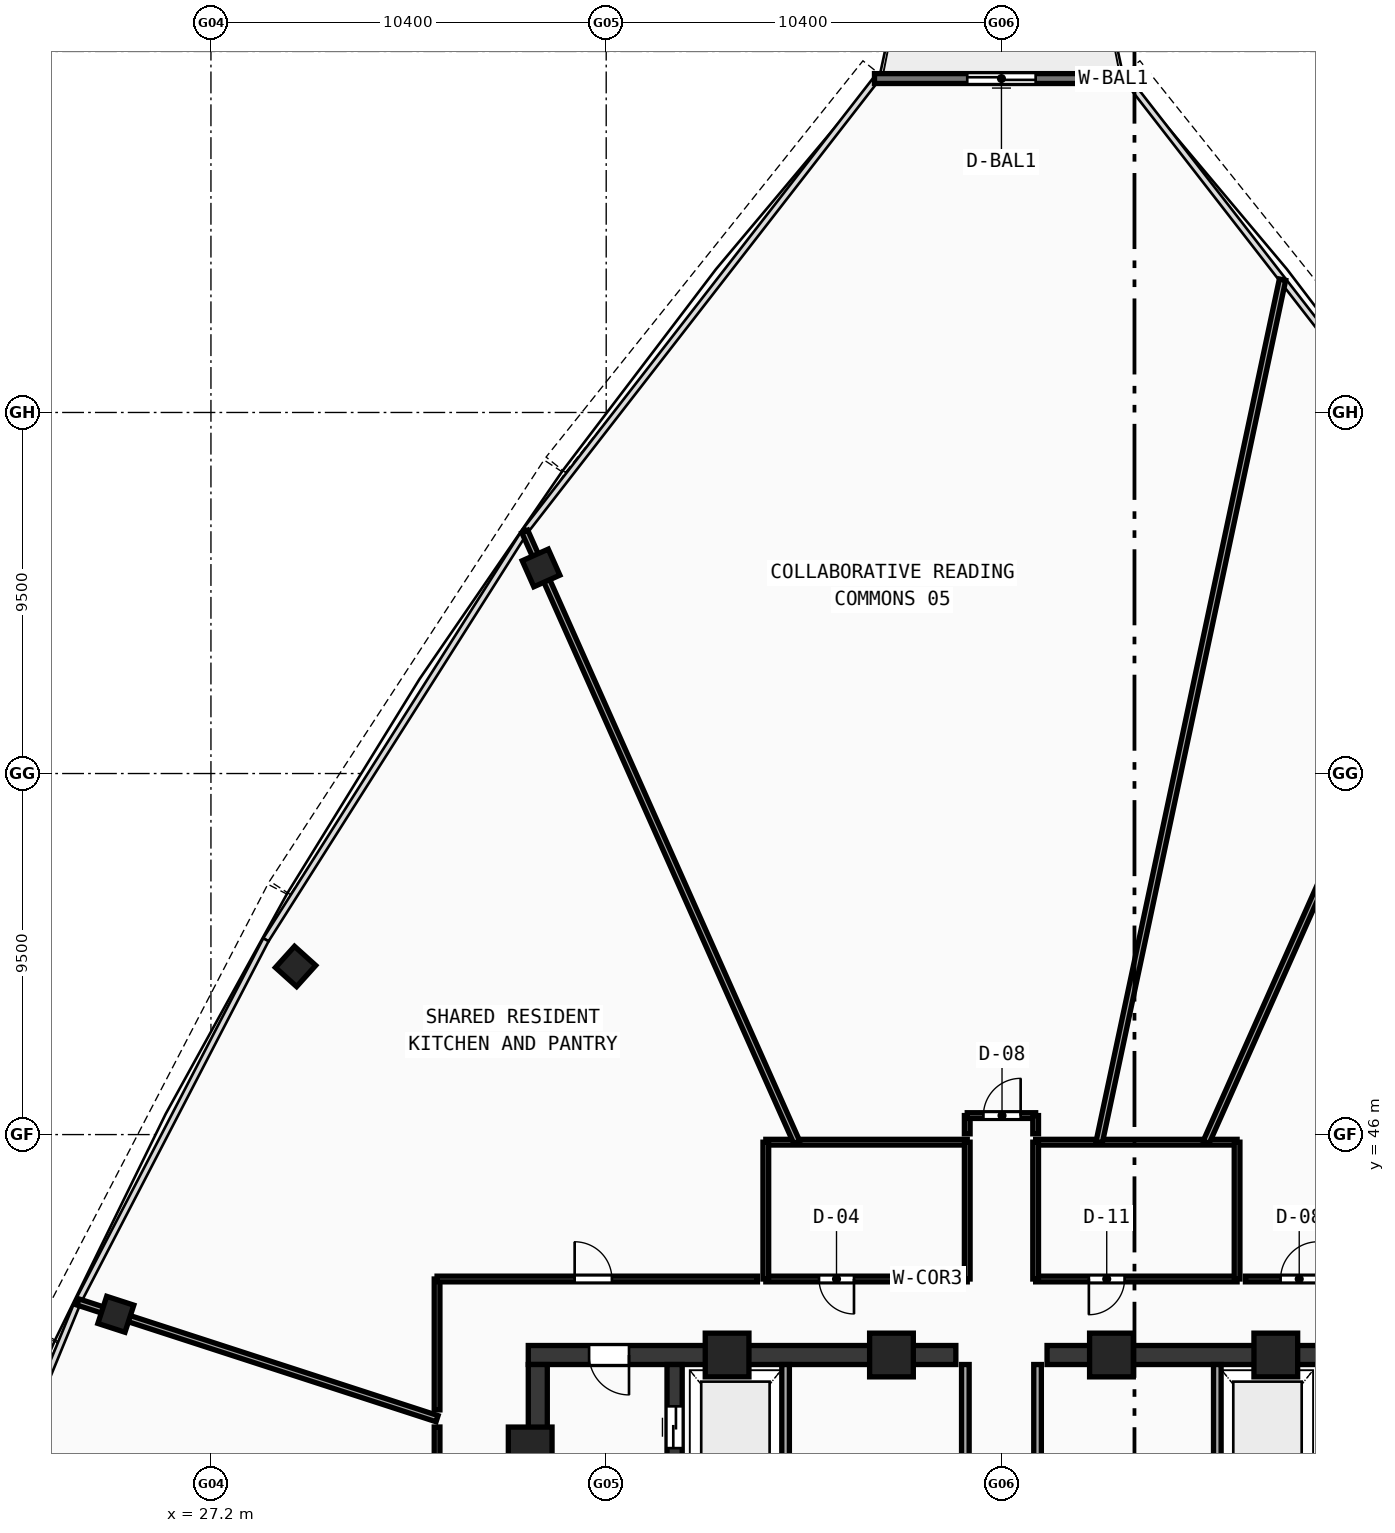
"""IFC4 building model, lengths in metres.
Left out: names, types, materials, properties, quantities, classifications, styles, units other than length and angle.
Written with IfcOpenShell. Run it as: python <this file> out.ifc"""

import sys

from ifc_helpers import new_model, si_unit, direction, frame, frame_2d, origin, origin_with_axes, origin_2d, place, context, subcontext, project, spatial, rectangle, hollow_rectangle, extrude, source, transform, mapped, element, fill, save


model = new_model("IFC4")
c1 = context("Model", 3, precision=1e-05, world=origin(), true_north=direction((0.0, 1.0)))
c2 = subcontext(c1, "Body", "Model", "MODEL_VIEW")
j1 = project(units=[si_unit("LENGTHUNIT", "METRE"), si_unit("PLANEANGLEUNIT", "RADIAN")], contexts=[c1])
p1 = place(None, origin())
s1 = spatial("IfcSite", under=j1, at=p1, CompositionType="ELEMENT")
p2 = place(p1, origin())
s2 = spatial("IfcBuilding", under=s1, at=p2, CompositionType="ELEMENT")
p3 = place(p2, frame((0.0, 0.0, 314.86)))
s3 = spatial("IfcBuildingStorey", under=s2, at=p3, CompositionType="ELEMENT", Elevation=314.86)
p4 = place(p3, frame((35.55, 40.2, 0.0), z_axis=(0.0, 0.0, 1.0), x_axis=(1.0, 0.0, 0.0)))
e1 = element("IfcWall", 1, at=p4, inside=s3, PredefinedType="SHEAR", context=c2, shape_type="SweptSolid", body=[
    extrude(rectangle(XDim=11.25, YDim=0.5, at=frame_2d((5.625, 0.0))), origin(), (0.0, 0.0, 1.0), 5.57),
])
p5 = place(p4, frame((1.6, 0.0, 0.0)))
e2 = element("IfcOpeningElement", 2, at=p5, cuts=e1, PredefinedType="OPENING", context=c2, shape_type="SweptSolid", body=[
    extrude(rectangle(XDim=1.05, YDim=2.1, at=frame_2d((0.525, 1.05))), frame((0.0, 0.26, 0.0), z_axis=(0.0, -1.0, 0.0), x_axis=(1.0, 0.0, 0.0)), (0.0, 0.0, 1.0), 0.52),
])
p6 = place(p3, frame((49.2, 40.2, 0.0), z_axis=(0.0, 0.0, 1.0), x_axis=(1.0, 0.0, 0.0)))
e3 = element("IfcWall", 3, at=p6, inside=s3, PredefinedType="SHEAR", context=c2, shape_type="SweptSolid", body=[
    extrude(rectangle(XDim=11.25, YDim=0.5, at=frame_2d((5.625, 0.0))), origin(), (0.0, 0.0, 1.0), 5.57),
])
p7 = place(p6, frame((8.6, 0.0, 0.0)))
e4 = element("IfcOpeningElement", 4, at=p7, cuts=e3, PredefinedType="OPENING", context=c2, shape_type="SweptSolid", body=[
    extrude(rectangle(XDim=1.05, YDim=2.1, at=frame_2d((0.525, 1.05))), frame((0.0, 0.26, 0.0), z_axis=(0.0, -1.0, 0.0), x_axis=(1.0, 0.0, 0.0)), (0.0, 0.0, 1.0), 0.52),
])
p8 = place(p3, frame((35.8, 27.75, 0.0), z_axis=(0.0, 0.0, 1.0), x_axis=(0.0, 1.0, 0.0)))
e5 = element("IfcWall", 5, at=p8, inside=s3, PredefinedType="SHEAR", context=c2, shape_type="SweptSolid", body=[
    extrude(rectangle(XDim=12.2, YDim=0.5, at=frame_2d((6.1, 0.0))), origin(), (0.0, 0.0, 1.0), 5.57),
])
p9 = place(p3, frame((39.4, 27.75, 0.0), z_axis=(0.0, 0.0, 1.0), x_axis=(0.0, 1.0, 0.0)))
e6 = element("IfcWall", 6, at=p9, inside=s3, PredefinedType="SHEAR", context=c2, shape_type="SweptSolid", body=[
    extrude(rectangle(XDim=12.2, YDim=0.4, at=frame_2d((6.1, 0.0))), origin(), (0.0, 0.0, 1.0), 5.57),
])
p10 = place(p9, frame((10.0, 0.0, 0.0)))
e7 = element("IfcOpeningElement", 7, at=p10, cuts=e6, PredefinedType="OPENING", context=c2, shape_type="SweptSolid", body=[
    extrude(rectangle(XDim=1.1, YDim=2.1, at=frame_2d((0.55, 1.05))), frame((0.0, 0.21, 0.0), z_axis=(0.0, -1.0, 0.0), x_axis=(1.0, 0.0, 0.0)), (0.0, 0.0, 1.0), 0.42),
])
m1 = source(origin(), c2, "Body", "SweptSolid", [
    extrude(hollow_rectangle(XDim=1.15, YDim=1.15, WallThickness=0.048, at=origin_2d()), origin(), (0.0, 0.0, 1.0), 5.83),
])
for number, where, z_axis, x_axis in (
    (8, (55.219, 40.2, -0.26), (0.0, 0.0, 1.0), (1.0, 0.0, 0.0)),
    (9, (50.894, 40.2, -0.26), (0.0, 0.0, 1.0), (1.0, 0.0, 0.0)),
    (10, (45.106, 40.2, -0.26), (0.0, 0.0, 1.0), (1.0, 0.0, 0.0)),
    (11, (40.781, 40.2, -0.26), (0.0, 0.0, 1.0), (1.0, 0.0, 0.0)),
    (12, (35.6, 37.729, -0.26), (0.0, 0.0, 1.0), (1.0, 0.0, 0.0)),
):
    element("IfcColumn", number, at=place(p3, frame(where, z_axis=z_axis, x_axis=x_axis)), inside=s3, PredefinedType="COLUMN", context=c2, shape_type="MappedRepresentation", body=[
        mapped(m1, transform((0.0, 0.0, 0.0), scale=1.0)),
    ])
m2 = source(origin(), c2, "Body", "SweptSolid", [
    extrude(hollow_rectangle(XDim=0.75, YDim=0.75, WallThickness=0.028, at=origin_2d()), origin(), (0.0, 0.0, 1.0), 5.83),
])
for number, where, z_axis, x_axis in (
    (13, (35.886, 60.909, -0.26), (0.0, 0.0, 1.0), (-0.914, -0.407, 0.0)),
    (14, (29.427, 50.424, -0.26), (0.0, 0.0, 1.0), (-0.669, -0.743, 0.0)),
    (15, (24.698, 41.271, -0.26), (0.0, 0.0, 1.0), (-0.309, -0.951, 0.0)),
):
    element("IfcColumn", number, at=place(p3, frame(where, z_axis=z_axis, x_axis=x_axis)), inside=s3, PredefinedType="COLUMN", context=c2, shape_type="MappedRepresentation", body=[
        mapped(m2, transform((0.0, 0.0, 0.0), scale=1.0)),
    ])
p11 = place(p3, frame((51.341, 73.786, 0.0), z_axis=(0.0, 0.0, 1.0), x_axis=(-1.0, 0.0, 0.0)))
e16 = element("IfcWall", 16, at=p11, inside=s3, PredefinedType="STANDARD", context=c2, shape_type="SweptSolid", body=[
    extrude(rectangle(XDim=6.682, YDim=0.26, at=frame_2d((3.341, 0.0))), origin(), (0.0, 0.0, 1.0), 5.57),
])
p12 = place(p11, frame((2.441, 0.0, 0.0)))
e17 = element("IfcOpeningElement", 17, at=p12, cuts=e16, PredefinedType="OPENING", context=c2, shape_type="SweptSolid", body=[
    extrude(rectangle(XDim=1.8, YDim=2.15, at=frame_2d((0.9, 1.075))), frame((0.0, 0.14, 0.0), z_axis=(0.0, -1.0, 0.0), x_axis=(1.0, 0.0, 0.0)), (0.0, 0.0, 1.0), 0.28),
])
p13 = place(p3, frame((42.32, 33.5, 0.0), z_axis=(0.0, 0.0, 1.0), x_axis=(0.0, 1.0, 0.0)))
e18 = element("IfcWall", 18, at=p13, inside=s3, PredefinedType="SOLIDWALL", context=c2, shape_type="SweptSolid", body=[
    extrude(rectangle(XDim=6.45, YDim=0.2, at=frame_2d((3.225, 0.0))), origin(), (0.0, 0.0, 1.0), 5.57),
])
p14 = place(p13, frame((1.0, 0.0, 0.0)))
e19 = element("IfcOpeningElement", 19, at=p14, cuts=e18, PredefinedType="OPENING", context=c2, shape_type="SweptSolid", body=[
    extrude(rectangle(XDim=1.05, YDim=2.1, at=frame_2d((0.525, 1.05))), frame((0.0, 0.11, 0.0), z_axis=(0.0, -1.0, 0.0), x_axis=(1.0, 0.0, 0.0)), (0.0, 0.0, 1.0), 0.22),
])
p15 = place(p3, frame((53.68, 36.65, 0.0), z_axis=(0.0, 0.0, 1.0), x_axis=(0.0, 1.0, 0.0)))
e20 = element("IfcWall", 20, at=p15, inside=s3, PredefinedType="SOLIDWALL", context=c2, shape_type="SweptSolid", body=[
    extrude(rectangle(XDim=3.3, YDim=0.2, at=frame_2d((1.65, 0.0))), origin(), (0.0, 0.0, 1.0), 5.57),
])
p16 = place(p3, frame((47.05, 37.32, 0.0), z_axis=(0.0, 0.0, 1.0), x_axis=(0.0, 1.0, 0.0)))
e21 = element("IfcWall", 21, at=p16, inside=s3, PredefinedType="SOLIDWALL", context=c2, shape_type="SweptSolid", body=[
    extrude(rectangle(XDim=2.63, YDim=0.2, at=frame_2d((1.315, 0.0))), origin(), (0.0, 0.0, 1.0), 5.57),
])
p17 = place(p3, frame((48.95, 35.85, 0.0), z_axis=(0.0, 0.0, 1.0), x_axis=(0.0, 1.0, 0.0)))
e22 = element("IfcWall", 22, at=p17, inside=s3, PredefinedType="SOLIDWALL", context=c2, shape_type="SweptSolid", body=[
    extrude(rectangle(XDim=4.1, YDim=0.2, at=frame_2d((2.05, 0.0))), origin(), (0.0, 0.0, 1.0), 5.57),
])
p18 = place(p3, frame((41.8, 42.2, 0.0), z_axis=(0.0, 0.0, 1.0), x_axis=(1.0, 0.0, 0.0)))
e23 = element("IfcWall", 23, at=p18, inside=s3, PredefinedType="PARTITIONING", context=c2, shape_type="SweptSolid", body=[
    extrude(rectangle(XDim=5.3, YDim=0.15, at=frame_2d((2.65, 0.0))), origin(), (0.0, 0.0, 1.0), 2.22),
])
p19 = place(p18, frame((1.4, 0.0, 0.0)))
e24 = element("IfcOpeningElement", 24, at=p19, cuts=e23, PredefinedType="OPENING", context=c2, shape_type="SweptSolid", body=[
    extrude(rectangle(XDim=0.92, YDim=2.1, at=frame_2d((0.46, 1.05))), frame((0.0, 0.085, 0.0), z_axis=(0.0, -1.0, 0.0), x_axis=(1.0, 0.0, 0.0)), (0.0, 0.0, 1.0), 0.17),
])
p20 = place(p3, frame((41.8, 45.8, 0.0), z_axis=(0.0, 0.0, 1.0), x_axis=(1.0, 0.0, 0.0)))
e25 = element("IfcWall", 25, at=p20, inside=s3, PredefinedType="PARTITIONING", context=c2, shape_type="SweptSolid", body=[
    extrude(rectangle(XDim=5.3, YDim=0.15, at=frame_2d((2.65, 0.0))), origin(), (0.0, 0.0, 1.0), 2.22),
])
p21 = place(p3, frame((41.8, 42.2, 0.0), z_axis=(0.0, 0.0, 1.0), x_axis=(0.0, 1.0, 0.0)))
e26 = element("IfcWall", 26, at=p21, inside=s3, PredefinedType="PARTITIONING", context=c2, shape_type="SweptSolid", body=[
    extrude(rectangle(XDim=3.6, YDim=0.15, at=frame_2d((1.8, 0.0))), origin(), (0.0, 0.0, 1.0), 5.22),
])
p22 = place(p3, frame((47.1, 42.2, 0.0), z_axis=(0.0, 0.0, 1.0), x_axis=(0.0, 1.0, 0.0)))
e27 = element("IfcWall", 27, at=p22, inside=s3, PredefinedType="PARTITIONING", context=c2, shape_type="SweptSolid", body=[
    extrude(rectangle(XDim=3.6, YDim=0.15, at=frame_2d((1.8, 0.0))), origin(), (0.0, 0.0, 1.0), 5.57),
])
p23 = place(p3, frame((48.9, 42.2, 0.0), z_axis=(0.0, 0.0, 1.0), x_axis=(1.0, 0.0, 0.0)))
e28 = element("IfcWall", 28, at=p23, inside=s3, PredefinedType="PARTITIONING", context=c2, shape_type="SweptSolid", body=[
    extrude(rectangle(XDim=5.3, YDim=0.15, at=frame_2d((2.65, 0.0))), origin(), (0.0, 0.0, 1.0), 2.22),
])
p24 = place(p23, frame((1.4, 0.0, 0.0)))
e29 = element("IfcOpeningElement", 29, at=p24, cuts=e28, PredefinedType="OPENING", context=c2, shape_type="SweptSolid", body=[
    extrude(rectangle(XDim=0.94, YDim=2.1, at=frame_2d((0.47, 1.05))), frame((0.0, 0.085, 0.0), z_axis=(0.0, -1.0, 0.0), x_axis=(1.0, 0.0, 0.0)), (0.0, 0.0, 1.0), 0.17),
])
p25 = place(p3, frame((48.9, 45.8, 0.0), z_axis=(0.0, 0.0, 1.0), x_axis=(1.0, 0.0, 0.0)))
e30 = element("IfcWall", 30, at=p25, inside=s3, PredefinedType="PARTITIONING", context=c2, shape_type="SweptSolid", body=[
    extrude(rectangle(XDim=5.3, YDim=0.15, at=frame_2d((2.65, 0.0))), origin(), (0.0, 0.0, 1.0), 2.22),
])
p26 = place(p3, frame((48.9, 42.2, 0.0), z_axis=(0.0, 0.0, 1.0), x_axis=(0.0, 1.0, 0.0)))
e31 = element("IfcWall", 31, at=p26, inside=s3, PredefinedType="PARTITIONING", context=c2, shape_type="SweptSolid", body=[
    extrude(rectangle(XDim=3.6, YDim=0.15, at=frame_2d((1.8, 0.0))), origin(), (0.0, 0.0, 1.0), 5.57),
])
p27 = place(p3, frame((54.2, 42.2, 0.0), z_axis=(0.0, 0.0, 1.0), x_axis=(0.0, 1.0, 0.0)))
e32 = element("IfcWall", 32, at=p27, inside=s3, PredefinedType="PARTITIONING", context=c2, shape_type="SweptSolid", body=[
    extrude(rectangle(XDim=3.6, YDim=0.15, at=frame_2d((1.8, 0.0))), origin(), (0.0, 0.0, 1.0), 5.22),
])
p28 = place(p3, frame((53.387, 45.8, 0.0), z_axis=(0.0, 0.0, 1.0), x_axis=(0.406746244391, 0.913541182801, 0.0)))
e33 = element("IfcWall", 33, at=p28, inside=s3, PredefinedType="PARTITIONING", context=c2, shape_type="SweptSolid", body=[
    extrude(rectangle(XDim=17.589, YDim=0.17, at=frame_2d((8.794, 0.0))), origin(), (0.0, 0.0, 1.0), 2.22),
])
p29 = place(p3, frame((50.572, 45.8, 0.0), z_axis=(0.0, 0.0, 1.0), x_axis=(0.207911865665, 0.978147563569, 0.0)))
e34 = element("IfcWall", 34, at=p29, inside=s3, PredefinedType="PARTITIONING", context=c2, shape_type="SweptSolid", body=[
    extrude(rectangle(XDim=23.201, YDim=0.17, at=frame_2d((11.601, 0.0))), origin(), (0.0, 0.0, 1.0), 4.97),
])
p30 = place(p3, frame((42.613, 45.8, 0.0), z_axis=(0.0, 0.0, 1.0), x_axis=(-0.406746244391, 0.913541182801, 0.0)))
e35 = element("IfcWall", 35, at=p30, inside=s3, PredefinedType="PARTITIONING", context=c2, shape_type="SweptSolid", body=[
    extrude(rectangle(XDim=17.589, YDim=0.17, at=frame_2d((8.794, 0.0))), origin(), (0.0, 0.0, 1.0), 2.22),
])
p31 = place(p3, frame((33.15, 38.525, 0.0), z_axis=(0.0, 0.0, 1.0), x_axis=(-0.951056273407, 0.309017741906, 0.0)))
e36 = element("IfcWall", 36, at=p31, inside=s3, PredefinedType="PARTITIONING", context=c2, shape_type="SweptSolid", body=[
    extrude(rectangle(XDim=9.937, YDim=0.17, at=frame_2d((4.969, 0.0))), origin(), (0.0, 0.0, 1.0), 2.22),
])
p32 = place(p3, frame((33.15, 31.301, 0.0), z_axis=(0.0, 0.0, 1.0), x_axis=(0.0, 1.0, 0.0)))
e37 = element("IfcWall", 37, at=p32, inside=s3, PredefinedType="PARTITIONING", context=c2, shape_type="SweptSolid", body=[
    extrude(rectangle(XDim=7.004, YDim=0.15, at=frame_2d((3.502, 0.0))), origin(), (0.0, 0.0, 1.0), 2.22),
])
p33 = place(p32, frame((3.027, 0.0, 0.0)))
e38 = element("IfcOpeningElement", 38, at=p33, cuts=e37, PredefinedType="OPENING", context=c2, shape_type="SweptSolid", body=[
    extrude(rectangle(XDim=0.98, YDim=2.12, at=frame_2d((0.49, 1.06))), frame((0.0, 0.085, 0.0), z_axis=(0.0, -1.0, 0.0), x_axis=(1.0, 0.0, 0.0)), (0.0, 0.0, 1.0), 0.17),
])
p34 = place(p3, frame((33.15, 38.756, 0.0), z_axis=(0.0, 0.0, 1.0), x_axis=(0.0, 1.0, 0.0)))
e39 = element("IfcWall", 39, at=p34, inside=s3, PredefinedType="PARTITIONING", context=c2, shape_type="SweptSolid", body=[
    extrude(rectangle(XDim=3.444, YDim=0.15, at=frame_2d((1.722, 0.0))), origin(), (0.0, 0.0, 1.0), 2.22),
])
p35 = place(p3, frame((33.15, 42.2, 0.0), z_axis=(0.0, 0.0, 1.0), x_axis=(1.0, 0.0, 0.0)))
e40 = element("IfcWall", 40, at=p35, inside=s3, PredefinedType="PARTITIONING", context=c2, shape_type="SweptSolid", body=[
    extrude(rectangle(XDim=8.43, YDim=0.15, at=frame_2d((4.215, 0.0))), origin(), (0.0, 0.0, 1.0), 2.22),
])
p36 = place(p35, frame((3.62, 0.0, 0.0)))
e41 = element("IfcOpeningElement", 41, at=p36, cuts=e40, PredefinedType="OPENING", context=c2, shape_type="SweptSolid", body=[
    extrude(rectangle(XDim=0.98, YDim=2.12, at=frame_2d((0.49, 1.06))), frame((0.0, 0.085, 0.0), z_axis=(0.0, -1.0, 0.0), x_axis=(1.0, 0.0, 0.0)), (0.0, 0.0, 1.0), 0.17),
])
p37 = place(p3, frame((47.1, 46.02, 0.0), z_axis=(0.0, 0.0, 1.0), x_axis=(0.0, 1.0, 0.0)))
e42 = element("IfcWall", 42, at=p37, inside=s3, PredefinedType="PARTITIONING", context=c2, shape_type="SweptSolid", body=[
    extrude(rectangle(XDim=0.48, YDim=0.15, at=frame_2d((0.24, 0.0))), origin(), (0.0, 0.0, 1.0), 5.22),
])
p38 = place(p3, frame((47.1, 46.5, 0.0), z_axis=(0.0, 0.0, 1.0), x_axis=(1.0, 0.0, 0.0)))
e43 = element("IfcWall", 43, at=p38, inside=s3, PredefinedType="PARTITIONING", context=c2, shape_type="SweptSolid", body=[
    extrude(rectangle(XDim=1.8, YDim=0.15, at=frame_2d((0.9, 0.0))), origin(), (0.0, 0.0, 1.0), 5.22),
])
p39 = place(p38, frame((0.425, 0.0, 0.0)))
e44 = element("IfcOpeningElement", 44, at=p39, cuts=e43, PredefinedType="OPENING", context=c2, shape_type="SweptSolid", body=[
    extrude(rectangle(XDim=0.98, YDim=2.12, at=frame_2d((0.49, 1.06))), frame((0.0, 0.085, 0.0), z_axis=(0.0, -1.0, 0.0), x_axis=(1.0, 0.0, 0.0)), (0.0, 0.0, 1.0), 0.17),
])
p40 = place(p3, frame((48.9, 46.5, 0.0), z_axis=(0.0, 0.0, 1.0), x_axis=(0.0, -1.0, 0.0)))
e45 = element("IfcWall", 45, at=p40, inside=s3, PredefinedType="PARTITIONING", context=c2, shape_type="SweptSolid", body=[
    extrude(rectangle(XDim=0.48, YDim=0.15, at=frame_2d((0.24, 0.0))), origin(), (0.0, 0.0, 1.0), 5.22),
])
p41 = place(p3, frame((54.42, 42.2, 0.0), z_axis=(0.0, 0.0, 1.0), x_axis=(1.0, 0.0, 0.0)))
e46 = element("IfcWall", 46, at=p41, inside=s3, PredefinedType="PARTITIONING", context=c2, shape_type="SweptSolid", body=[
    extrude(rectangle(XDim=2.801, YDim=0.15, at=frame_2d((1.4, 0.0))), origin(), (0.0, 0.0, 1.0), 2.22),
])
p42 = place(p41, frame((0.925, 0.0, 0.0)))
e47 = element("IfcOpeningElement", 47, at=p42, cuts=e46, PredefinedType="OPENING", context=c2, shape_type="SweptSolid", body=[
    extrude(rectangle(XDim=0.98, YDim=2.12, at=frame_2d((0.49, 1.06))), frame((0.0, 0.085, 0.0), z_axis=(0.0, -1.0, 0.0), x_axis=(1.0, 0.0, 0.0)), (0.0, 0.0, 1.0), 0.17),
])
m3 = source(origin(), c2, "Body", "SweptSolid", [
    extrude(rectangle(XDim=1.8, YDim=2.15, at=frame_2d((0.9, 1.075))), frame((0.0, 0.025, 0.0), z_axis=(0.0, -1.0, 0.0), x_axis=(1.0, 0.0, 0.0)), (0.0, 0.0, 1.0), 0.05),
])
p43 = place(p12, origin_with_axes())
e48 = element("IfcDoor", 48, at=p43, inside=s3, OperationType="DOUBLE_DOOR_SLIDING", PredefinedType="DOOR", context=c2, shape_type="MappedRepresentation", body=[
    mapped(m3, transform((0.0, 0.0, 0.0), scale=1.0)),
])
fill(e17, e48)
m4 = source(origin(), c2, "Body", "SweptSolid", [
    extrude(rectangle(XDim=1.05, YDim=2.1, at=frame_2d((0.525, 1.05))), frame((0.0, 0.025, 0.0), z_axis=(0.0, -1.0, 0.0), x_axis=(1.0, 0.0, 0.0)), (0.0, 0.0, 1.0), 0.05),
])
p44 = place(p5, frame((1.05, 0.0, 0.0), z_axis=(0.0, 0.0, 1.0), x_axis=(-1.0, 0.0, 0.0)))
e49 = element("IfcDoor", 49, at=p44, inside=s3, OperationType="SINGLE_SWING_LEFT", PredefinedType="DOOR", context=c2, shape_type="MappedRepresentation", body=[
    mapped(m4, transform((0.0, 0.0, 0.0), scale=1.0)),
])
fill(e2, e49)
m5 = source(origin(), c2, "Body", "SweptSolid", [
    extrude(rectangle(XDim=1.1, YDim=2.1, at=frame_2d((0.55, 1.05))), frame((0.0, 0.025, 0.0), z_axis=(0.0, -1.0, 0.0), x_axis=(1.0, 0.0, 0.0)), (0.0, 0.0, 1.0), 0.05),
])
p45 = place(p10, frame((1.1, 0.0, 0.0), z_axis=(0.0, 0.0, 1.0), x_axis=(-1.0, 0.0, 0.0)))
e50 = element("IfcDoor", 50, at=p45, inside=s3, OperationType="DOUBLE_DOOR_SLIDING", PredefinedType="DOOR", context=c2, shape_type="MappedRepresentation", body=[
    mapped(m5, transform((0.0, 0.0, 0.0), scale=1.0)),
])
fill(e7, e50)
m6 = source(origin(), c2, "Body", "SweptSolid", [
    extrude(rectangle(XDim=0.92, YDim=2.1, at=frame_2d((0.46, 1.05))), frame((0.0, 0.025, 0.0), z_axis=(0.0, -1.0, 0.0), x_axis=(1.0, 0.0, 0.0)), (0.0, 0.0, 1.0), 0.05),
])
p46 = place(p19, frame((0.92, 0.0, 0.0), z_axis=(0.0, 0.0, 1.0), x_axis=(-1.0, 0.0, 0.0)))
e51 = element("IfcDoor", 51, at=p46, inside=s3, OperationType="SINGLE_SWING_LEFT", PredefinedType="DOOR", context=c2, shape_type="MappedRepresentation", body=[
    mapped(m6, transform((0.0, 0.0, 0.0), scale=1.0)),
])
fill(e24, e51)
m7 = source(origin(), c2, "Body", "SweptSolid", [
    extrude(rectangle(XDim=0.94, YDim=2.1, at=frame_2d((0.47, 1.05))), frame((0.0, 0.025, 0.0), z_axis=(0.0, -1.0, 0.0), x_axis=(1.0, 0.0, 0.0)), (0.0, 0.0, 1.0), 0.05),
])
p47 = place(p24, frame((0.94, 0.0, 0.0), z_axis=(0.0, 0.0, 1.0), x_axis=(-1.0, 0.0, 0.0)))
e52 = element("IfcDoor", 52, at=p47, inside=s3, OperationType="SINGLE_SWING_RIGHT", PredefinedType="DOOR", context=c2, shape_type="MappedRepresentation", body=[
    mapped(m7, transform((0.0, 0.0, 0.0), scale=1.0)),
])
fill(e29, e52)
m8 = source(origin(), c2, "Body", "SweptSolid", [
    extrude(rectangle(XDim=0.98, YDim=2.12, at=frame_2d((0.49, 1.06))), frame((0.0, 0.025, 0.0), z_axis=(0.0, -1.0, 0.0), x_axis=(1.0, 0.0, 0.0)), (0.0, 0.0, 1.0), 0.05),
])
p48 = place(p42, origin_with_axes())
e53 = element("IfcDoor", 53, at=p48, inside=s3, OperationType="SINGLE_SWING_RIGHT", PredefinedType="DOOR", context=c2, shape_type="MappedRepresentation", body=[
    mapped(m8, transform((0.0, 0.0, 0.0), scale=1.0)),
])
fill(e47, e53)
p49 = place(p39, origin_with_axes())
e54 = element("IfcDoor", 54, at=p49, inside=s3, OperationType="SINGLE_SWING_RIGHT", PredefinedType="DOOR", context=c2, shape_type="MappedRepresentation", body=[
    mapped(m8, transform((0.0, 0.0, 0.0), scale=1.0)),
])
fill(e44, e54)
p50 = place(p36, origin_with_axes())
e55 = element("IfcDoor", 55, at=p50, inside=s3, OperationType="SINGLE_SWING_LEFT", PredefinedType="DOOR", context=c2, shape_type="MappedRepresentation", body=[
    mapped(m8, transform((0.0, 0.0, 0.0), scale=1.0)),
])
fill(e41, e55)
save(model, sys.argv[1])
